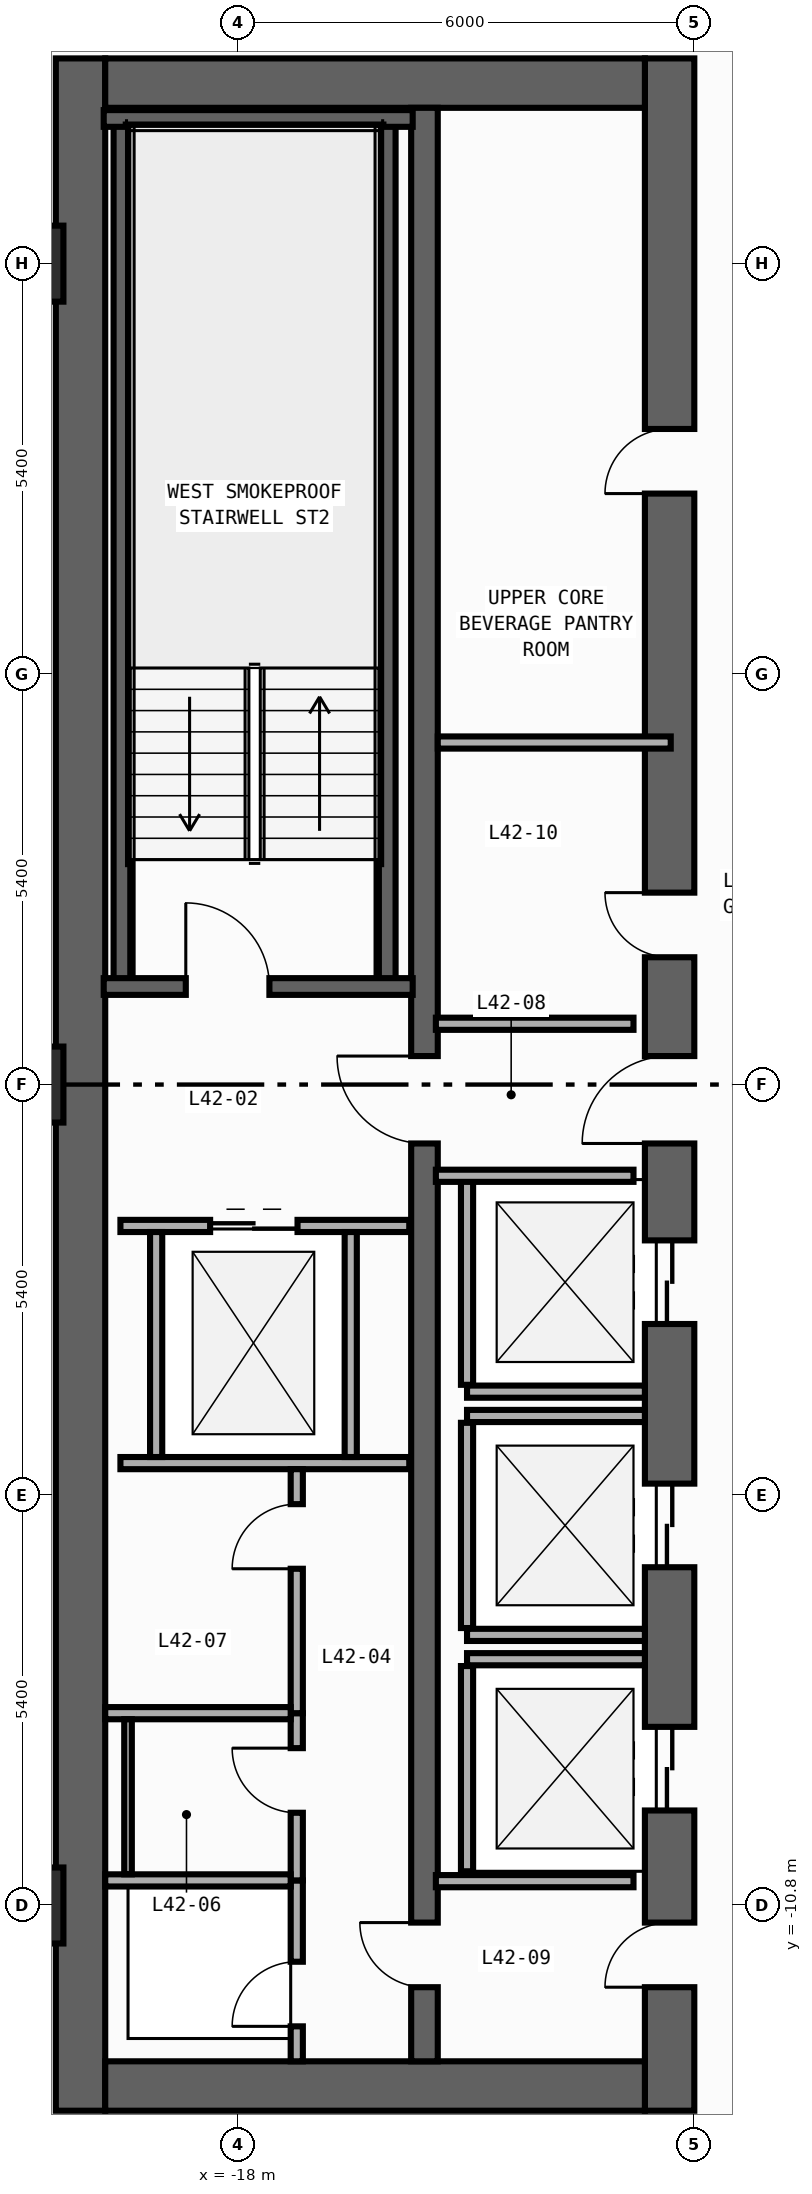
"""IFC4 building model, lengths in metres.
Left out: names, types, materials, properties, quantities, classifications, styles, units other than length and angle.
Written with IfcOpenShell. Run it as: python <this file> out.ifc"""

import sys

from ifc_helpers import new_model, si_unit, direction, frame, frame_2d, origin, origin_2d, place, context, subcontext, project, spatial, rectangle, extrude, element, fill, save


model = new_model("IFC4")
c1 = context("Model", 3, precision=1e-05, world=origin(), true_north=direction((0.0, 1.0)))
c2 = subcontext(c1, "Body", "Model", "MODEL_VIEW")
j1 = project(units=[si_unit("LENGTHUNIT", "METRE"), si_unit("PLANEANGLEUNIT", "RADIAN")], contexts=[c1])
p1 = place(None, origin())
s1 = spatial("IfcSite", under=j1, at=p1, CompositionType="ELEMENT")
p2 = place(p1, origin())
s2 = spatial("IfcBuilding", under=s1, at=p2, CompositionType="ELEMENT")
p3 = place(p2, frame((0.0, 0.0, 184.0)))
s3 = spatial("IfcBuildingStorey", under=s2, at=p3, CompositionType="ELEMENT", Elevation=184.0)
p4 = place(p3, frame((-20.075, -13.5, 0.0), z_axis=(0.0, 0.0, 1.0), x_axis=(0.0, 1.0, 0.0)))
e1 = element("IfcWall", 1, at=p4, inside=s3, PredefinedType="SHEAR", context=c2, shape_type="SweptSolid", body=[
    extrude(rectangle(XDim=27.0, YDim=0.65, at=frame_2d((13.5, 0.0))), origin(), (0.0, 0.0, 1.0), 3.54),
])
p5 = place(p3, frame((-12.325, -13.5, 0.0), z_axis=(0.0, 0.0, 1.0), x_axis=(0.0, 1.0, 0.0)))
e2 = element("IfcWall", 2, at=p5, inside=s3, PredefinedType="SHEAR", context=c2, shape_type="SweptSolid", body=[
    extrude(rectangle(XDim=27.0, YDim=0.65, at=frame_2d((13.5, 0.0))), origin(), (0.0, 0.0, 1.0), 3.54),
])
p6 = place(p5, frame((10.35, 0.0, 0.0)))
e3 = element("IfcOpeningElement", 3, at=p6, cuts=e2, PredefinedType="OPENING", context=c2, shape_type="SweptSolid", body=[
    extrude(rectangle(XDim=1.1, YDim=2.2, at=frame_2d((0.55, 1.1))), frame((0.0, 0.335, 0.0), z_axis=(0.0, -1.0, 0.0), x_axis=(1.0, 0.0, 0.0)), (0.0, 0.0, 1.0), 0.67),
])
p7 = place(p5, frame((7.15, 0.0, 0.0)))
e4 = element("IfcOpeningElement", 4, at=p7, cuts=e2, PredefinedType="OPENING", context=c2, shape_type="SweptSolid", body=[
    extrude(rectangle(XDim=1.1, YDim=2.2, at=frame_2d((0.55, 1.1))), frame((0.0, 0.335, 0.0), z_axis=(0.0, -1.0, 0.0), x_axis=(1.0, 0.0, 0.0)), (0.0, 0.0, 1.0), 0.67),
])
p8 = place(p5, frame((3.95, 0.0, 0.0)))
e5 = element("IfcOpeningElement", 5, at=p8, cuts=e2, PredefinedType="OPENING", context=c2, shape_type="SweptSolid", body=[
    extrude(rectangle(XDim=1.1, YDim=2.2, at=frame_2d((0.55, 1.1))), frame((0.0, 0.335, 0.0), z_axis=(0.0, -1.0, 0.0), x_axis=(1.0, 0.0, 0.0)), (0.0, 0.0, 1.0), 0.67),
])
p9 = place(p5, frame((15.175, 0.0, 0.0)))
e6 = element("IfcOpeningElement", 6, at=p9, cuts=e2, PredefinedType="OPENING", context=c2, shape_type="SweptSolid", body=[
    extrude(rectangle(XDim=0.85, YDim=2.1, at=frame_2d((0.425, 1.05))), frame((0.0, 0.335, 0.0), z_axis=(0.0, -1.0, 0.0), x_axis=(1.0, 0.0, 0.0)), (0.0, 0.0, 1.0), 0.67),
])
p10 = place(p5, frame((21.275, 0.0, 0.0)))
e7 = element("IfcOpeningElement", 7, at=p10, cuts=e2, PredefinedType="OPENING", context=c2, shape_type="SweptSolid", body=[
    extrude(rectangle(XDim=0.85, YDim=2.1, at=frame_2d((0.425, 1.05))), frame((0.0, 0.335, 0.0), z_axis=(0.0, -1.0, 0.0), x_axis=(1.0, 0.0, 0.0)), (0.0, 0.0, 1.0), 0.67),
])
p11 = place(p5, frame((12.725, 0.0, 0.0)))
e8 = element("IfcOpeningElement", 8, at=p11, cuts=e2, PredefinedType="OPENING", context=c2, shape_type="SweptSolid", body=[
    extrude(rectangle(XDim=1.15, YDim=2.2, at=frame_2d((0.575, 1.1))), frame((0.0, 0.335, 0.0), z_axis=(0.0, -1.0, 0.0), x_axis=(1.0, 0.0, 0.0)), (0.0, 0.0, 1.0), 0.67),
])
p12 = place(p5, frame((1.625, 0.0, 0.0)))
e9 = element("IfcOpeningElement", 9, at=p12, cuts=e2, PredefinedType="OPENING", context=c2, shape_type="SweptSolid", body=[
    extrude(rectangle(XDim=0.85, YDim=2.1, at=frame_2d((0.425, 1.05))), frame((0.0, 0.335, 0.0), z_axis=(0.0, -1.0, 0.0), x_axis=(1.0, 0.0, 0.0)), (0.0, 0.0, 1.0), 0.67),
])
for number, where, z_axis, x_axis in (
    (10, (-19.75, -13.175, 0.0), (0.0, 0.0, 1.0), (1.0, 0.0, 0.0)),
    (11, (-19.75, 13.175, 0.0), (0.0, 0.0, 1.0), (1.0, 0.0, 0.0)),
):
    element("IfcWall", number, at=place(p3, frame(where, z_axis=z_axis, x_axis=x_axis)), inside=s3, PredefinedType="SHEAR", context=c2, shape_type="SweptSolid", body=[
        extrude(rectangle(XDim=7.1, YDim=0.65, at=frame_2d((3.55, 0.0))), origin(), (0.0, 0.0, 1.0), 3.54),
    ])
p13 = place(p3, frame((-15.55, -12.85, 0.0), z_axis=(0.0, 0.0, 1.0), x_axis=(0.0, 1.0, 0.0)))
e12 = element("IfcWall", 12, at=p13, inside=s3, PredefinedType="SHEAR", context=c2, shape_type="SweptSolid", body=[
    extrude(rectangle(XDim=25.7, YDim=0.35, at=frame_2d((12.85, 0.0))), origin(), (0.0, 0.0, 1.0), 3.54),
])
p14 = place(p13, frame((12.075, 0.0, 0.0)))
e13 = element("IfcOpeningElement", 13, at=p14, cuts=e12, PredefinedType="OPENING", context=c2, shape_type="SweptSolid", body=[
    extrude(rectangle(XDim=1.15, YDim=2.2, at=frame_2d((0.575, 1.1))), frame((0.0, 0.185, 0.0), z_axis=(0.0, -1.0, 0.0), x_axis=(1.0, 0.0, 0.0)), (0.0, 0.0, 1.0), 0.37),
])
p15 = place(p13, frame((0.975, 0.0, 0.0)))
e14 = element("IfcOpeningElement", 14, at=p15, cuts=e12, PredefinedType="OPENING", context=c2, shape_type="SweptSolid", body=[
    extrude(rectangle(XDim=0.85, YDim=2.1, at=frame_2d((0.425, 1.05))), frame((0.0, 0.185, 0.0), z_axis=(0.0, -1.0, 0.0), x_axis=(1.0, 0.0, 0.0)), (0.0, 0.0, 1.0), 0.37),
])
for number, where, z_axis, x_axis in (
    (15, (-16.04, 1.29, 0.0), (0.0, 0.0, 1.0), (0.0, 1.0, 0.0)),
    (16, (-19.53, 1.29, 0.0), (0.0, 0.0, 1.0), (0.0, 1.0, 0.0)),
):
    element("IfcWall", number, at=place(p3, frame(where, z_axis=z_axis, x_axis=x_axis)), inside=s3, PredefinedType="SHEAR", context=c2, shape_type="SweptSolid", body=[
        extrude(rectangle(XDim=11.42, YDim=0.22, at=frame_2d((5.71, 0.0))), origin(), (0.0, 0.0, 1.0), 3.54),
    ])
p16 = place(p3, frame((-19.77, 12.71, 0.0), z_axis=(0.0, 0.0, 1.0), x_axis=(1.0, 0.0, 0.0)))
e17 = element("IfcWall", 17, at=p16, inside=s3, PredefinedType="SHEAR", context=c2, shape_type="SweptSolid", body=[
    extrude(rectangle(XDim=4.065, YDim=0.22, at=frame_2d((2.032, 0.0))), origin(), (0.0, 0.0, 1.0), 3.54),
])
p17 = place(p3, frame((-19.77, 1.29, 0.0), z_axis=(0.0, 0.0, 1.0), x_axis=(1.0, 0.0, 0.0)))
e18 = element("IfcWall", 18, at=p17, inside=s3, PredefinedType="SHEAR", context=c2, shape_type="SweptSolid", body=[
    extrude(rectangle(XDim=4.065, YDim=0.22, at=frame_2d((2.032, 0.0))), origin(), (0.0, 0.0, 1.0), 3.54),
])
p18 = place(p17, frame((1.08, 0.0, 0.0)))
e19 = element("IfcOpeningElement", 19, at=p18, cuts=e18, PredefinedType="OPENING", context=c2, shape_type="SweptSolid", body=[
    extrude(rectangle(XDim=1.1, YDim=2.2, at=frame_2d((0.55, 1.1))), frame((0.0, 0.12, 0.0), z_axis=(0.0, -1.0, 0.0), x_axis=(1.0, 0.0, 0.0)), (0.0, 0.0, 1.0), 0.24),
])
for number, where, z_axis, x_axis in (
    (20, (-20.8, -10.8, 0.0), (0.0, 0.0, 1.0), (1.0, 0.0, 0.0)),
    (21, (-20.8, 0.0, 0.0), (0.0, 0.0, 1.0), (1.0, 0.0, 0.0)),
    (22, (-20.8, 10.8, 0.0), (0.0, 0.0, 1.0), (1.0, 0.0, 0.0)),
):
    element("IfcColumn", number, at=place(p3, frame(where, z_axis=z_axis, x_axis=x_axis)), inside=s3, PredefinedType="COLUMN", context=c2, shape_type="SweptSolid", body=[
        extrude(rectangle(XDim=1.0, YDim=1.0, at=origin_2d()), origin(), (0.0, 0.0, 1.0), 3.8),
    ])
p19 = place(p3, frame((-14.99, -4.04, 0.0), z_axis=(0.0, 0.0, 1.0), x_axis=(1.0, 0.0, 0.0)))
e23 = element("IfcWall", 23, at=p19, inside=s3, PredefinedType="STANDARD", context=c2, shape_type="SweptSolid", body=[
    extrude(rectangle(XDim=2.34, YDim=0.16, at=frame_2d((1.17, 0.0))), origin(), (0.0, 0.0, 1.0), 3.54),
])
p20 = place(p3, frame((-14.99, -3.95, 0.0), z_axis=(0.0, 0.0, 1.0), x_axis=(0.0, 1.0, 0.0)))
e24 = element("IfcWall", 24, at=p20, inside=s3, PredefinedType="STANDARD", context=c2, shape_type="SweptSolid", body=[
    extrude(rectangle(XDim=2.7, YDim=0.16, at=frame_2d((1.35, 0.0))), origin(), (0.0, 0.0, 1.0), 3.54),
])
for number, where, z_axis, x_axis in (
    (25, (-14.99, -7.24, 0.0), (0.0, 0.0, 1.0), (1.0, 0.0, 0.0)),
    (26, (-14.99, -4.36, 0.0), (0.0, 0.0, 1.0), (1.0, 0.0, 0.0)),
):
    element("IfcWall", number, at=place(p3, frame(where, z_axis=z_axis, x_axis=x_axis)), inside=s3, PredefinedType="STANDARD", context=c2, shape_type="SweptSolid", body=[
        extrude(rectangle(XDim=2.34, YDim=0.16, at=frame_2d((1.17, 0.0))), origin(), (0.0, 0.0, 1.0), 3.54),
    ])
p21 = place(p3, frame((-14.99, -7.15, 0.0), z_axis=(0.0, 0.0, 1.0), x_axis=(0.0, 1.0, 0.0)))
e27 = element("IfcWall", 27, at=p21, inside=s3, PredefinedType="STANDARD", context=c2, shape_type="SweptSolid", body=[
    extrude(rectangle(XDim=2.7, YDim=0.16, at=frame_2d((1.35, 0.0))), origin(), (0.0, 0.0, 1.0), 3.54),
])
p22 = place(p3, frame((-14.99, -7.56, 0.0), z_axis=(0.0, 0.0, 1.0), x_axis=(1.0, 0.0, 0.0)))
e28 = element("IfcWall", 28, at=p22, inside=s3, PredefinedType="STANDARD", context=c2, shape_type="SweptSolid", body=[
    extrude(rectangle(XDim=2.34, YDim=0.16, at=frame_2d((1.17, 0.0))), origin(), (0.0, 0.0, 1.0), 3.54),
])
p23 = place(p3, frame((-14.99, -10.35, 0.0), z_axis=(0.0, 0.0, 1.0), x_axis=(0.0, 1.0, 0.0)))
e29 = element("IfcWall", 29, at=p23, inside=s3, PredefinedType="STANDARD", context=c2, shape_type="SweptSolid", body=[
    extrude(rectangle(XDim=2.7, YDim=0.16, at=frame_2d((1.35, 0.0))), origin(), (0.0, 0.0, 1.0), 3.54),
])
p24 = place(p3, frame((-19.55, -1.86, 0.0), z_axis=(0.0, 0.0, 1.0), x_axis=(1.0, 0.0, 0.0)))
e30 = element("IfcWall", 30, at=p24, inside=s3, PredefinedType="STANDARD", context=c2, shape_type="SweptSolid", body=[
    extrude(rectangle(XDim=3.8, YDim=0.16, at=frame_2d((1.9, 0.0))), origin(), (0.0, 0.0, 1.0), 3.54),
])
p25 = place(p24, frame((1.18, 0.0, 0.0)))
e31 = element("IfcOpeningElement", 31, at=p25, cuts=e30, PredefinedType="OPENING", context=c2, shape_type="SweptSolid", body=[
    extrude(rectangle(XDim=1.15, YDim=2.2, at=frame_2d((0.575, 1.1))), frame((0.0, 0.09, 0.0), z_axis=(0.0, -1.0, 0.0), x_axis=(1.0, 0.0, 0.0)), (0.0, 0.0, 1.0), 0.18),
])
p26 = place(p3, frame((-19.55, -4.98, 0.0), z_axis=(0.0, 0.0, 1.0), x_axis=(1.0, 0.0, 0.0)))
e32 = element("IfcWall", 32, at=p26, inside=s3, PredefinedType="STANDARD", context=c2, shape_type="SweptSolid", body=[
    extrude(rectangle(XDim=3.8, YDim=0.16, at=frame_2d((1.9, 0.0))), origin(), (0.0, 0.0, 1.0), 3.54),
])
for number, where, z_axis, x_axis in (
    (33, (-19.08, -4.9, 0.0), (0.0, 0.0, 1.0), (0.0, 1.0, 0.0)),
    (34, (-16.52, -4.9, 0.0), (0.0, 0.0, 1.0), (0.0, 1.0, 0.0)),
):
    element("IfcWall", number, at=place(p3, frame(where, z_axis=z_axis, x_axis=x_axis)), inside=s3, PredefinedType="STANDARD", context=c2, shape_type="SweptSolid", body=[
        extrude(rectangle(XDim=2.96, YDim=0.16, at=frame_2d((1.48, 0.0))), origin(), (0.0, 0.0, 1.0), 3.54),
    ])
for number, where, z_axis, x_axis in (
    (35, (-15.4, 0.8, 0.0), (0.0, 0.0, 1.0), (1.0, 0.0, 0.0)),
    (36, (-15.4, -1.2, 0.0), (0.0, 0.0, 1.0), (1.0, 0.0, 0.0)),
    (37, (-15.4, -10.48, 0.0), (0.0, 0.0, 1.0), (1.0, 0.0, 0.0)),
):
    element("IfcWall", number, at=place(p3, frame(where, z_axis=z_axis, x_axis=x_axis)), inside=s3, PredefinedType="STANDARD", context=c2, shape_type="SweptSolid", body=[
        extrude(rectangle(XDim=2.6, YDim=0.16, at=frame_2d((1.3, 0.0))), origin(), (0.0, 0.0, 1.0), 3.54),
    ])
p27 = place(p3, frame((-17.23, -12.85, 0.0), z_axis=(0.0, 0.0, 1.0), x_axis=(0.0, 1.0, 0.0)))
e38 = element("IfcWall", 38, at=p27, inside=s3, PredefinedType="PARTITIONING", context=c2, shape_type="SweptSolid", body=[
    extrude(rectangle(XDim=2.38, YDim=0.16, at=frame_2d((1.19, 0.0))), origin(), (0.0, 0.0, 1.0), 3.54),
])
p28 = place(p27, frame((0.46, 0.0, 0.0)))
e39 = element("IfcOpeningElement", 39, at=p28, cuts=e38, PredefinedType="OPENING", context=c2, shape_type="SweptSolid", body=[
    extrude(rectangle(XDim=0.85, YDim=2.1, at=frame_2d((0.425, 1.05))), frame((0.0, 0.09, 0.0), z_axis=(0.0, -1.0, 0.0), x_axis=(1.0, 0.0, 0.0)), (0.0, 0.0, 1.0), 0.18),
])
p29 = place(p3, frame((-17.23, -10.47, 0.0), z_axis=(0.0, 0.0, 1.0), x_axis=(0.0, 1.0, 0.0)))
e40 = element("IfcWall", 40, at=p29, inside=s3, PredefinedType="PARTITIONING", context=c2, shape_type="SweptSolid", body=[
    extrude(rectangle(XDim=2.2, YDim=0.16, at=frame_2d((1.1, 0.0))), origin(), (0.0, 0.0, 1.0), 3.54),
])
p30 = place(p29, frame((0.89, 0.0, 0.0)))
e41 = element("IfcOpeningElement", 41, at=p30, cuts=e40, PredefinedType="OPENING", context=c2, shape_type="SweptSolid", body=[
    extrude(rectangle(XDim=0.85, YDim=2.1, at=frame_2d((0.425, 1.05))), frame((0.0, 0.09, 0.0), z_axis=(0.0, -1.0, 0.0), x_axis=(1.0, 0.0, 0.0)), (0.0, 0.0, 1.0), 0.18),
])
p31 = place(p3, frame((-17.23, -8.27, 0.0), z_axis=(0.0, 0.0, 1.0), x_axis=(0.0, 1.0, 0.0)))
e42 = element("IfcWall", 42, at=p31, inside=s3, PredefinedType="PARTITIONING", context=c2, shape_type="SweptSolid", body=[
    extrude(rectangle(XDim=3.21, YDim=0.16, at=frame_2d((1.605, 0.0))), origin(), (0.0, 0.0, 1.0), 3.54),
])
p32 = place(p31, frame((1.9, 0.0, 0.0)))
e43 = element("IfcOpeningElement", 43, at=p32, cuts=e42, PredefinedType="OPENING", context=c2, shape_type="SweptSolid", body=[
    extrude(rectangle(XDim=0.85, YDim=2.1, at=frame_2d((0.425, 1.05))), frame((0.0, 0.09, 0.0), z_axis=(0.0, -1.0, 0.0), x_axis=(1.0, 0.0, 0.0)), (0.0, 0.0, 1.0), 0.18),
])
for number, where, z_axis, x_axis in (
    (44, (-19.75, -10.47, 0.0), (0.0, 0.0, 1.0), (1.0, 0.0, 0.0)),
    (45, (-19.75, -8.27, 0.0), (0.0, 0.0, 1.0), (1.0, 0.0, 0.0)),
):
    element("IfcWall", number, at=place(p3, frame(where, z_axis=z_axis, x_axis=x_axis)), inside=s3, PredefinedType="PARTITIONING", context=c2, shape_type="SweptSolid", body=[
        extrude(rectangle(XDim=2.44, YDim=0.16, at=frame_2d((1.22, 0.0))), origin(), (0.0, 0.0, 1.0), 3.54),
    ])
p33 = place(p3, frame((-15.375, 4.5, 0.0), z_axis=(0.0, 0.0, 1.0), x_axis=(1.0, 0.0, 0.0)))
e46 = element("IfcWall", 46, at=p33, inside=s3, PredefinedType="PARTITIONING", context=c2, shape_type="SweptSolid", body=[
    extrude(rectangle(XDim=3.065, YDim=0.16, at=frame_2d((1.532, 0.0))), origin(), (0.0, 0.0, 1.0), 3.54),
])
p34 = place(p3, frame((-19.45, -10.39, 0.0), z_axis=(0.0, 0.0, 1.0), x_axis=(0.0, 1.0, 0.0)))
e47 = element("IfcWall", 47, at=p34, inside=s3, PredefinedType="PARTITIONING", context=c2, shape_type="SweptSolid", body=[
    extrude(rectangle(XDim=2.04, YDim=0.1, at=frame_2d((1.02, 0.0))), origin(), (0.0, 0.0, 1.0), 3.54),
])
p35 = place(p18, origin())
e48 = element("IfcDoor", 48, at=p35, inside=s3, OperationType="SINGLE_SWING_LEFT", PredefinedType="DOOR", context=c2, shape_type="SweptSolid", body=[
    extrude(rectangle(XDim=1.1, YDim=2.2, at=frame_2d((0.55, 1.1))), frame((0.0, 0.025, 0.0), z_axis=(0.0, -1.0, 0.0), x_axis=(1.0, 0.0, 0.0)), (0.0, 0.0, 1.0), 0.05),
])
fill(e19, e48)
p36 = place(p6, origin())
e49 = element("IfcDoor", 49, at=p36, inside=s3, OperationType="DOUBLE_DOOR_SLIDING", PredefinedType="DOOR", context=c2, shape_type="SweptSolid", body=[
    extrude(rectangle(XDim=1.1, YDim=2.2, at=frame_2d((0.55, 1.1))), frame((0.0, 0.025, 0.0), z_axis=(0.0, -1.0, 0.0), x_axis=(1.0, 0.0, 0.0)), (0.0, 0.0, 1.0), 0.05),
])
fill(e3, e49)
p37 = place(p7, origin())
e50 = element("IfcDoor", 50, at=p37, inside=s3, OperationType="DOUBLE_DOOR_SLIDING", PredefinedType="DOOR", context=c2, shape_type="SweptSolid", body=[
    extrude(rectangle(XDim=1.1, YDim=2.2, at=frame_2d((0.55, 1.1))), frame((0.0, 0.025, 0.0), z_axis=(0.0, -1.0, 0.0), x_axis=(1.0, 0.0, 0.0)), (0.0, 0.0, 1.0), 0.05),
])
fill(e4, e50)
p38 = place(p8, origin())
e51 = element("IfcDoor", 51, at=p38, inside=s3, OperationType="DOUBLE_DOOR_SLIDING", PredefinedType="DOOR", context=c2, shape_type="SweptSolid", body=[
    extrude(rectangle(XDim=1.1, YDim=2.2, at=frame_2d((0.55, 1.1))), frame((0.0, 0.025, 0.0), z_axis=(0.0, -1.0, 0.0), x_axis=(1.0, 0.0, 0.0)), (0.0, 0.0, 1.0), 0.05),
])
fill(e5, e51)
p39 = place(p9, origin())
e52 = element("IfcDoor", 52, at=p39, inside=s3, OperationType="SINGLE_SWING_RIGHT", PredefinedType="DOOR", context=c2, shape_type="SweptSolid", body=[
    extrude(rectangle(XDim=0.85, YDim=2.1, at=frame_2d((0.425, 1.05))), frame((0.0, 0.025, 0.0), z_axis=(0.0, -1.0, 0.0), x_axis=(1.0, 0.0, 0.0)), (0.0, 0.0, 1.0), 0.05),
])
fill(e6, e52)
p40 = place(p10, origin())
e53 = element("IfcDoor", 53, at=p40, inside=s3, OperationType="SINGLE_SWING_LEFT", PredefinedType="DOOR", context=c2, shape_type="SweptSolid", body=[
    extrude(rectangle(XDim=0.85, YDim=2.1, at=frame_2d((0.425, 1.05))), frame((0.0, 0.025, 0.0), z_axis=(0.0, -1.0, 0.0), x_axis=(1.0, 0.0, 0.0)), (0.0, 0.0, 1.0), 0.05),
])
fill(e7, e53)
p41 = place(p11, origin())
e54 = element("IfcDoor", 54, at=p41, inside=s3, OperationType="SINGLE_SWING_LEFT", PredefinedType="DOOR", context=c2, shape_type="SweptSolid", body=[
    extrude(rectangle(XDim=1.15, YDim=2.2, at=frame_2d((0.575, 1.1))), frame((0.0, 0.025, 0.0), z_axis=(0.0, -1.0, 0.0), x_axis=(1.0, 0.0, 0.0)), (0.0, 0.0, 1.0), 0.05),
])
fill(e8, e54)
p42 = place(p14, origin())
e55 = element("IfcDoor", 55, at=p42, inside=s3, OperationType="SINGLE_SWING_RIGHT", PredefinedType="DOOR", context=c2, shape_type="SweptSolid", body=[
    extrude(rectangle(XDim=1.15, YDim=2.2, at=frame_2d((0.575, 1.1))), frame((0.0, 0.025, 0.0), z_axis=(0.0, -1.0, 0.0), x_axis=(1.0, 0.0, 0.0)), (0.0, 0.0, 1.0), 0.05),
])
fill(e13, e55)
p43 = place(p12, origin())
e56 = element("IfcDoor", 56, at=p43, inside=s3, OperationType="SINGLE_SWING_LEFT", PredefinedType="DOOR", context=c2, shape_type="SweptSolid", body=[
    extrude(rectangle(XDim=0.85, YDim=2.1, at=frame_2d((0.425, 1.05))), frame((0.0, 0.025, 0.0), z_axis=(0.0, -1.0, 0.0), x_axis=(1.0, 0.0, 0.0)), (0.0, 0.0, 1.0), 0.05),
])
fill(e9, e56)
p44 = place(p15, origin())
e57 = element("IfcDoor", 57, at=p44, inside=s3, OperationType="SINGLE_SWING_RIGHT", PredefinedType="DOOR", context=c2, shape_type="SweptSolid", body=[
    extrude(rectangle(XDim=0.85, YDim=2.1, at=frame_2d((0.425, 1.05))), frame((0.0, 0.025, 0.0), z_axis=(0.0, -1.0, 0.0), x_axis=(1.0, 0.0, 0.0)), (0.0, 0.0, 1.0), 0.05),
])
fill(e14, e57)
p45 = place(p25, origin())
e58 = element("IfcDoor", 58, at=p45, inside=s3, OperationType="DOUBLE_DOOR_SLIDING", PredefinedType="DOOR", context=c2, shape_type="SweptSolid", body=[
    extrude(rectangle(XDim=1.15, YDim=2.2, at=frame_2d((0.575, 1.1))), frame((0.0, 0.025, 0.0), z_axis=(0.0, -1.0, 0.0), x_axis=(1.0, 0.0, 0.0)), (0.0, 0.0, 1.0), 0.05),
])
fill(e31, e58)
p46 = place(p28, origin())
e59 = element("IfcDoor", 59, at=p46, inside=s3, OperationType="SINGLE_SWING_LEFT", PredefinedType="DOOR", context=c2, shape_type="SweptSolid", body=[
    extrude(rectangle(XDim=0.85, YDim=2.1, at=frame_2d((0.425, 1.05))), frame((0.0, 0.025, 0.0), z_axis=(0.0, -1.0, 0.0), x_axis=(1.0, 0.0, 0.0)), (0.0, 0.0, 1.0), 0.05),
])
fill(e39, e59)
p47 = place(p30, origin())
e60 = element("IfcDoor", 60, at=p47, inside=s3, OperationType="SINGLE_SWING_RIGHT", PredefinedType="DOOR", context=c2, shape_type="SweptSolid", body=[
    extrude(rectangle(XDim=0.85, YDim=2.1, at=frame_2d((0.425, 1.05))), frame((0.0, 0.025, 0.0), z_axis=(0.0, -1.0, 0.0), x_axis=(1.0, 0.0, 0.0)), (0.0, 0.0, 1.0), 0.05),
])
fill(e41, e60)
p48 = place(p32, origin())
e61 = element("IfcDoor", 61, at=p48, inside=s3, OperationType="SINGLE_SWING_LEFT", PredefinedType="DOOR", context=c2, shape_type="SweptSolid", body=[
    extrude(rectangle(XDim=0.85, YDim=2.1, at=frame_2d((0.425, 1.05))), frame((0.0, 0.025, 0.0), z_axis=(0.0, -1.0, 0.0), x_axis=(1.0, 0.0, 0.0)), (0.0, 0.0, 1.0), 0.05),
])
fill(e43, e61)
save(model, sys.argv[1])
